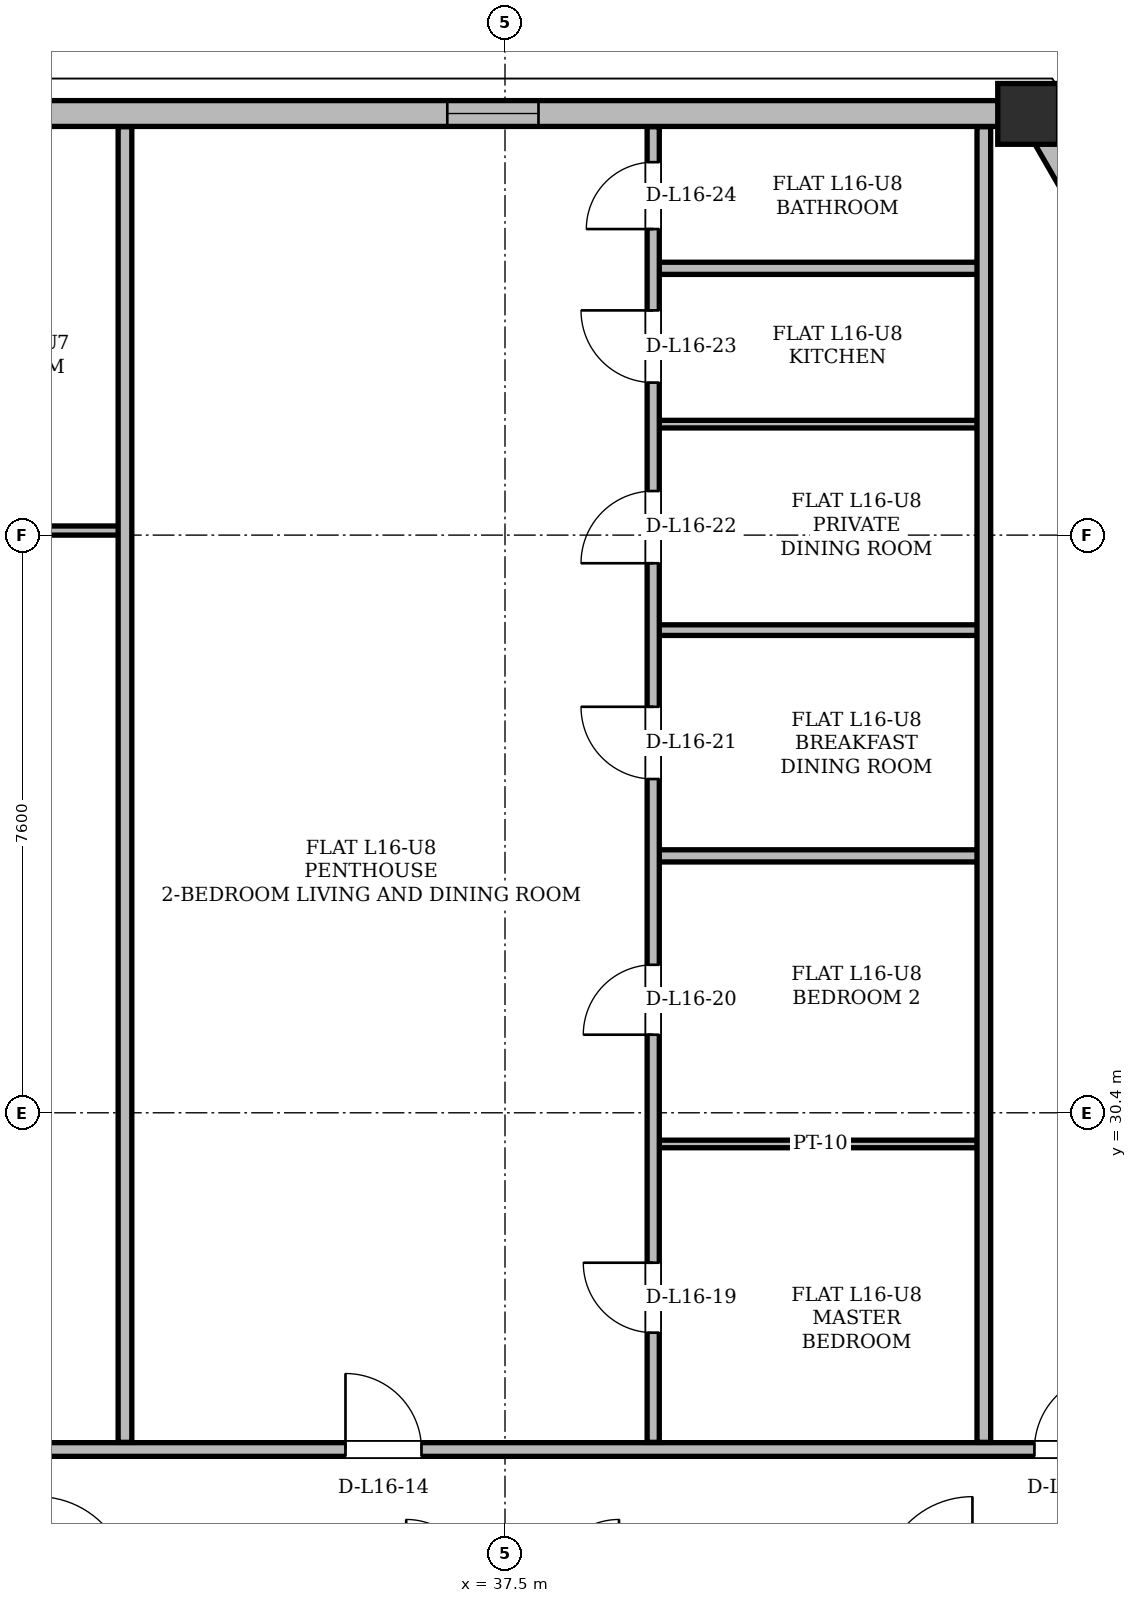
"""IFC4 building model, lengths in metres.
Left out: names, types, materials, properties, quantities, classifications, styles, units other than length and angle.
Written with IfcOpenShell. Run it as: python <this file> out.ifc"""

import sys

from ifc_helpers import new_model, si_unit, direction, frame, frame_2d, origin, origin_2d, place, context, subcontext, project, spatial, rectangle, hollow_rectangle, extrude, element, fill, save


model = new_model("IFC4")
c1 = context("Model", 3, precision=1e-05, world=origin(), true_north=direction((0.0, 1.0)))
c2 = subcontext(c1, "Body", "Model", "MODEL_VIEW")
j1 = project(units=[si_unit("LENGTHUNIT", "METRE"), si_unit("PLANEANGLEUNIT", "RADIAN")], contexts=[c1])
p1 = place(None, origin())
s1 = spatial("IfcSite", under=j1, at=p1, CompositionType="ELEMENT")
p2 = place(p1, origin())
s2 = spatial("IfcBuilding", under=s1, at=p2, CompositionType="ELEMENT")
p3 = place(p2, frame((0.0, 0.0, 63.3)))
s3 = spatial("IfcBuildingStorey", under=s2, at=p3, CompositionType="ELEMENT", Elevation=63.3)
p4 = place(p3, frame((44.436, 43.546, 0.004), z_axis=(-0.029221221178, -0.002582340476, 0.999569633268), x_axis=(0.088029024614, -0.996117910102, 0.0)))
e1 = element("IfcColumn", 1, at=p4, inside=s3, PredefinedType="COLUMN", context=c2, shape_type="SweptSolid", body=[
    extrude(hollow_rectangle(XDim=0.8, YDim=0.8, WallThickness=0.065, at=origin_2d()), origin(), (0.0, 0.0, 1.0), 3.593),
])
p5 = place(p3, frame((61.273, 14.383, 0.0), z_axis=(0.0, 0.0, 1.0), x_axis=(-0.500001933811, 0.866024287295, 0.0)))
e2 = element("IfcWall", 2, at=p5, inside=s3, PredefinedType="SOLIDWALL", context=c2, shape_type="SweptSolid", body=[
    extrude(rectangle(XDim=33.675, YDim=0.34, at=frame_2d((16.837, 0.0))), origin(), (0.0, 0.0, 1.0), 2.494),
])
p6 = place(p5, frame((7.615, 0.0, 0.0)))
e3 = element("IfcOpeningElement", 3, at=p6, cuts=e2, PredefinedType="OPENING", context=c2, shape_type="SweptSolid", body=[
    extrude(rectangle(XDim=1.5, YDim=2.2, at=frame_2d((0.75, 1.1))), frame((0.0, 0.17, 0.0), z_axis=(0.0, -1.0, 0.0), x_axis=(1.0, 0.0, 0.0)), (0.0, 0.0, 1.0), 0.34),
])
p7 = place(p5, frame((25.805, 0.0, 0.0)))
e4 = element("IfcOpeningElement", 4, at=p7, cuts=e2, PredefinedType="OPENING", context=c2, shape_type="SweptSolid", body=[
    extrude(rectangle(XDim=1.5, YDim=2.2, at=frame_2d((0.75, 1.1))), frame((0.0, 0.17, 0.0), z_axis=(0.0, -1.0, 0.0), x_axis=(1.0, 0.0, 0.0)), (0.0, 0.0, 1.0), 0.34),
])
p8 = place(p5, frame((1.57, 0.0, 0.85)))
e5 = element("IfcOpeningElement", 5, at=p8, cuts=e2, PredefinedType="OPENING", context=c2, shape_type="SweptSolid", body=[
    extrude(rectangle(XDim=1.4, YDim=1.534, at=frame_2d((0.7, 0.767))), frame((0.0, 0.17, 0.0), z_axis=(0.0, -1.0, 0.0), x_axis=(1.0, 0.0, 0.0)), (0.0, 0.0, 1.0), 0.34),
])
p9 = place(p5, frame((20.436, 0.0, 0.85)))
e6 = element("IfcOpeningElement", 6, at=p9, cuts=e2, PredefinedType="OPENING", context=c2, shape_type="SweptSolid", body=[
    extrude(rectangle(XDim=1.2, YDim=1.48, at=frame_2d((0.6, 0.74))), frame((0.0, 0.17, 0.0), z_axis=(0.0, -1.0, 0.0), x_axis=(1.0, 0.0, 0.0)), (0.0, 0.0, 1.0), 0.34),
])
p10 = place(p5, frame((29.61, 0.0, 0.85)))
e7 = element("IfcOpeningElement", 7, at=p10, cuts=e2, PredefinedType="OPENING", context=c2, shape_type="SweptSolid", body=[
    extrude(rectangle(XDim=2.2, YDim=1.534, at=frame_2d((1.1, 0.767))), frame((0.0, 0.17, 0.0), z_axis=(0.0, -1.0, 0.0), x_axis=(1.0, 0.0, 0.0)), (0.0, 0.0, 1.0), 0.34),
])
p11 = place(p5, frame((15.013, 0.0, 0.85)))
e8 = element("IfcOpeningElement", 8, at=p11, cuts=e2, PredefinedType="OPENING", context=c2, shape_type="SweptSolid", body=[
    extrude(rectangle(XDim=1.2, YDim=1.48, at=frame_2d((0.6, 0.74))), frame((0.0, 0.17, 0.0), z_axis=(0.0, -1.0, 0.0), x_axis=(1.0, 0.0, 0.0)), (0.0, 0.0, 1.0), 0.34),
])
p12 = place(p5, frame((17.765, 0.0, 0.85)))
e9 = element("IfcOpeningElement", 9, at=p12, cuts=e2, PredefinedType="OPENING", context=c2, shape_type="SweptSolid", body=[
    extrude(rectangle(XDim=1.2, YDim=1.48, at=frame_2d((0.6, 0.74))), frame((0.0, 0.17, 0.0), z_axis=(0.0, -1.0, 0.0), x_axis=(1.0, 0.0, 0.0)), (0.0, 0.0, 1.0), 0.34),
])
p13 = place(p3, frame((44.436, 43.546, 0.0), z_axis=(0.0, 0.0, 1.0), x_axis=(-1.0, 0.0, 0.0)))
e10 = element("IfcWall", 10, at=p13, inside=s3, PredefinedType="SOLIDWALL", context=c2, shape_type="SweptSolid", body=[
    extrude(rectangle(XDim=13.872, YDim=0.34, at=frame_2d((6.936, 0.0))), origin(), (0.0, 0.0, 1.0), 2.494),
])
p14 = place(p13, frame((6.495, 0.0, 0.85)))
e11 = element("IfcOpeningElement", 11, at=p14, cuts=e10, PredefinedType="OPENING", context=c2, shape_type="SweptSolid", body=[
    extrude(rectangle(XDim=1.2, YDim=1.48, at=frame_2d((0.6, 0.74))), frame((0.0, 0.17, 0.0), z_axis=(0.0, -1.0, 0.0), x_axis=(1.0, 0.0, 0.0)), (0.0, 0.0, 1.0), 0.34),
])
p15 = place(p3, frame((27.55, 25.97, 0.0), z_axis=(0.0, 0.0, 1.0), x_axis=(1.0, 0.0, 0.0)))
e12 = element("IfcWall", 12, at=p15, inside=s3, PredefinedType="PARTITIONING", context=c2, shape_type="SweptSolid", body=[
    extrude(rectangle(XDim=19.9, YDim=0.18, at=frame_2d((9.95, 0.0))), origin(), (0.0, 0.0, 1.0), 2.738),
])
p16 = place(p15, frame((2.07, 0.0, 0.0)))
e13 = element("IfcOpeningElement", 13, at=p16, cuts=e12, PredefinedType="OPENING", context=c2, shape_type="SweptSolid", body=[
    extrude(rectangle(XDim=1.0, YDim=2.18, at=frame_2d((0.5, 1.09))), frame((0.0, 0.09, 0.0), z_axis=(0.0, -1.0, 0.0), x_axis=(1.0, 0.0, 0.0)), (0.0, 0.0, 1.0), 0.18),
])
p17 = place(p15, frame((7.851, 0.0, 0.0)))
e14 = element("IfcOpeningElement", 14, at=p17, cuts=e12, PredefinedType="OPENING", context=c2, shape_type="SweptSolid", body=[
    extrude(rectangle(XDim=1.0, YDim=2.18, at=frame_2d((0.5, 1.09))), frame((0.0, 0.09, 0.0), z_axis=(0.0, -1.0, 0.0), x_axis=(1.0, 0.0, 0.0)), (0.0, 0.0, 1.0), 0.18),
])
p18 = place(p15, frame((16.916, 0.0, 0.0)))
e15 = element("IfcOpeningElement", 15, at=p18, cuts=e12, PredefinedType="OPENING", context=c2, shape_type="SweptSolid", body=[
    extrude(rectangle(XDim=1.0, YDim=2.18, at=frame_2d((0.5, 1.09))), frame((0.0, 0.09, 0.0), z_axis=(0.0, -1.0, 0.0), x_axis=(1.0, 0.0, 0.0)), (0.0, 0.0, 1.0), 0.18),
])
p19 = place(p3, frame((39.45, 29.99, 0.0), z_axis=(0.0, 0.0, 1.0), x_axis=(1.0, 0.0, 0.0)))
e16 = element("IfcWall", 16, at=p19, inside=s3, PredefinedType="PARTITIONING", context=c2, shape_type="SweptSolid", body=[
    extrude(rectangle(XDim=4.4, YDim=0.1, at=frame_2d((2.2, 0.0))), origin(), (0.0, 0.0, 1.0), 3.36),
])
p20 = place(p3, frame((39.45, 33.78, 0.0), z_axis=(0.0, 0.0, 1.0), x_axis=(1.0, 0.0, 0.0)))
e17 = element("IfcWall", 17, at=p20, inside=s3, PredefinedType="PARTITIONING", context=c2, shape_type="SweptSolid", body=[
    extrude(rectangle(XDim=4.4, YDim=0.16, at=frame_2d((2.2, 0.0))), origin(), (0.0, 0.0, 1.0), 3.36),
])
p21 = place(p3, frame((39.45, 36.75, 0.0), z_axis=(0.0, 0.0, 1.0), x_axis=(1.0, 0.0, 0.0)))
e18 = element("IfcWall", 18, at=p21, inside=s3, PredefinedType="PARTITIONING", context=c2, shape_type="SweptSolid", body=[
    extrude(rectangle(XDim=4.4, YDim=0.14, at=frame_2d((2.2, 0.0))), origin(), (0.0, 0.0, 1.0), 3.36),
])
p22 = place(p3, frame((27.598, 38.06, 0.0), z_axis=(0.0, 0.0, 1.0), x_axis=(1.0, 0.0, 0.0)))
e19 = element("IfcWall", 19, at=p22, inside=s3, PredefinedType="PARTITIONING", context=c2, shape_type="SweptSolid", body=[
    extrude(rectangle(XDim=4.984, YDim=0.12, at=frame_2d((2.492, 0.0))), origin(), (0.0, 0.0, 1.0), 2.738),
])
p23 = place(p22, frame((1.995, 0.0, 0.0)))
e20 = element("IfcOpeningElement", 20, at=p23, cuts=e19, PredefinedType="OPENING", context=c2, shape_type="SweptSolid", body=[
    extrude(rectangle(XDim=0.88, YDim=2.08, at=frame_2d((0.44, 1.04))), frame((0.0, 0.06, 0.0), z_axis=(0.0, -1.0, 0.0), x_axis=(1.0, 0.0, 0.0)), (0.0, 0.0, 1.0), 0.12),
])
p24 = place(p3, frame((39.45, 39.46, 0.0), z_axis=(0.0, 0.0, 1.0), x_axis=(1.0, 0.0, 0.0)))
e21 = element("IfcWall", 21, at=p24, inside=s3, PredefinedType="PARTITIONING", context=c2, shape_type="SweptSolid", body=[
    extrude(rectangle(XDim=4.4, YDim=0.1, at=frame_2d((2.2, 0.0))), origin(), (0.0, 0.0, 1.0), 3.36),
])
p25 = place(p3, frame((39.45, 41.51, 0.0), z_axis=(0.0, 0.0, 1.0), x_axis=(1.0, 0.0, 0.0)))
e22 = element("IfcWall", 22, at=p25, inside=s3, PredefinedType="PARTITIONING", context=c2, shape_type="SweptSolid", body=[
    extrude(rectangle(XDim=4.4, YDim=0.16, at=frame_2d((2.2, 0.0))), origin(), (0.0, 0.0, 1.0), 3.36),
])
p26 = place(p3, frame((32.5, 26.064, 0.0), z_axis=(0.0, 0.0, 1.0), x_axis=(0.0, 1.0, 0.0)))
e23 = element("IfcWall", 23, at=p26, inside=s3, PredefinedType="PARTITIONING", context=c2, shape_type="SweptSolid", body=[
    extrude(rectangle(XDim=17.309, YDim=0.18, at=frame_2d((8.654, 0.0))), origin(), (0.0, 0.0, 1.0), 3.36),
])
p27 = place(p3, frame((39.45, 26.064, 0.0), z_axis=(0.0, 0.0, 1.0), x_axis=(0.0, 1.0, 0.0)))
e24 = element("IfcWall", 24, at=p27, inside=s3, PredefinedType="PARTITIONING", context=c2, shape_type="SweptSolid", body=[
    extrude(rectangle(XDim=17.309, YDim=0.16, at=frame_2d((8.654, 0.0))), origin(), (0.0, 0.0, 1.0), 3.36),
])
p28 = place(p27, frame((1.443, 0.0, 0.0)))
e25 = element("IfcOpeningElement", 25, at=p28, cuts=e24, PredefinedType="OPENING", context=c2, shape_type="SweptSolid", body=[
    extrude(rectangle(XDim=0.92, YDim=2.12, at=frame_2d((0.46, 1.06))), frame((0.0, 0.08, 0.0), z_axis=(0.0, -1.0, 0.0), x_axis=(1.0, 0.0, 0.0)), (0.0, 0.0, 1.0), 0.16),
])
p29 = place(p27, frame((5.363, 0.0, 0.0)))
e26 = element("IfcOpeningElement", 26, at=p29, cuts=e24, PredefinedType="OPENING", context=c2, shape_type="SweptSolid", body=[
    extrude(rectangle(XDim=0.92, YDim=2.12, at=frame_2d((0.46, 1.06))), frame((0.0, 0.08, 0.0), z_axis=(0.0, -1.0, 0.0), x_axis=(1.0, 0.0, 0.0)), (0.0, 0.0, 1.0), 0.16),
])
p30 = place(p27, frame((8.727, 0.0, 0.0)))
e27 = element("IfcOpeningElement", 27, at=p30, cuts=e24, PredefinedType="OPENING", context=c2, shape_type="SweptSolid", body=[
    extrude(rectangle(XDim=0.95, YDim=2.1, at=frame_2d((0.475, 1.05))), frame((0.0, 0.08, 0.0), z_axis=(0.0, -1.0, 0.0), x_axis=(1.0, 0.0, 0.0)), (0.0, 0.0, 1.0), 0.16),
])
p31 = place(p27, frame((11.566, 0.0, 0.0)))
e28 = element("IfcOpeningElement", 28, at=p31, cuts=e24, PredefinedType="OPENING", context=c2, shape_type="SweptSolid", body=[
    extrude(rectangle(XDim=0.95, YDim=2.1, at=frame_2d((0.475, 1.05))), frame((0.0, 0.08, 0.0), z_axis=(0.0, -1.0, 0.0), x_axis=(1.0, 0.0, 0.0)), (0.0, 0.0, 1.0), 0.16),
])
p32 = place(p27, frame((13.942, 0.0, 0.0)))
e29 = element("IfcOpeningElement", 29, at=p32, cuts=e24, PredefinedType="OPENING", context=c2, shape_type="SweptSolid", body=[
    extrude(rectangle(XDim=0.95, YDim=2.1, at=frame_2d((0.475, 1.05))), frame((0.0, 0.08, 0.0), z_axis=(0.0, -1.0, 0.0), x_axis=(1.0, 0.0, 0.0)), (0.0, 0.0, 1.0), 0.16),
])
p33 = place(p27, frame((15.962, 0.0, 0.0)))
e30 = element("IfcOpeningElement", 30, at=p33, cuts=e24, PredefinedType="OPENING", context=c2, shape_type="SweptSolid", body=[
    extrude(rectangle(XDim=0.88, YDim=2.08, at=frame_2d((0.44, 1.04))), frame((0.0, 0.08, 0.0), z_axis=(0.0, -1.0, 0.0), x_axis=(1.0, 0.0, 0.0)), (0.0, 0.0, 1.0), 0.16),
])
p34 = place(p3, frame((43.8, 26.064, 0.0), z_axis=(0.0, 0.0, 1.0), x_axis=(0.0, 1.0, 0.0)))
e31 = element("IfcWall", 31, at=p34, inside=s3, PredefinedType="PARTITIONING", context=c2, shape_type="SweptSolid", body=[
    extrude(rectangle(XDim=17.309, YDim=0.18, at=frame_2d((8.654, 0.0))), origin(), (0.0, 0.0, 1.0), 3.36),
])
p35 = place(p14, origin())
e32 = element("IfcWindow", 32, at=p35, inside=s3, PartitioningType="SINGLE_PANEL", PredefinedType="WINDOW", context=c2, shape_type="SweptSolid", body=[
    extrude(rectangle(XDim=1.2, YDim=1.48, at=frame_2d((0.6, 0.74))), frame((0.0, 0.03, 0.0), z_axis=(0.0, -1.0, 0.0), x_axis=(1.0, 0.0, 0.0)), (0.0, 0.0, 1.0), 0.06),
])
fill(e11, e32)
p36 = place(p17, origin())
e33 = element("IfcDoor", 33, at=p36, inside=s3, OperationType="SINGLE_SWING_LEFT", PredefinedType="DOOR", context=c2, shape_type="SweptSolid", body=[
    extrude(rectangle(XDim=1.0, YDim=2.18, at=frame_2d((0.5, 1.09))), frame((0.0, 0.025, 0.0), z_axis=(0.0, -1.0, 0.0), x_axis=(1.0, 0.0, 0.0)), (0.0, 0.0, 1.0), 0.05),
])
fill(e14, e33)
p37 = place(p18, origin())
e34 = element("IfcDoor", 34, at=p37, inside=s3, OperationType="SINGLE_SWING_RIGHT", PredefinedType="DOOR", context=c2, shape_type="SweptSolid", body=[
    extrude(rectangle(XDim=1.0, YDim=2.18, at=frame_2d((0.5, 1.09))), frame((0.0, 0.025, 0.0), z_axis=(0.0, -1.0, 0.0), x_axis=(1.0, 0.0, 0.0)), (0.0, 0.0, 1.0), 0.05),
])
fill(e15, e34)
p38 = place(p28, origin())
e35 = element("IfcDoor", 35, at=p38, inside=s3, OperationType="SINGLE_SWING_RIGHT", PredefinedType="DOOR", context=c2, shape_type="SweptSolid", body=[
    extrude(rectangle(XDim=0.92, YDim=2.12, at=frame_2d((0.46, 1.06))), frame((0.0, 0.025, 0.0), z_axis=(0.0, -1.0, 0.0), x_axis=(1.0, 0.0, 0.0)), (0.0, 0.0, 1.0), 0.05),
])
fill(e25, e35)
p39 = place(p29, origin())
e36 = element("IfcDoor", 36, at=p39, inside=s3, OperationType="SINGLE_SWING_LEFT", PredefinedType="DOOR", context=c2, shape_type="SweptSolid", body=[
    extrude(rectangle(XDim=0.92, YDim=2.12, at=frame_2d((0.46, 1.06))), frame((0.0, 0.025, 0.0), z_axis=(0.0, -1.0, 0.0), x_axis=(1.0, 0.0, 0.0)), (0.0, 0.0, 1.0), 0.05),
])
fill(e26, e36)
p40 = place(p30, origin())
e37 = element("IfcDoor", 37, at=p40, inside=s3, OperationType="SINGLE_SWING_RIGHT", PredefinedType="DOOR", context=c2, shape_type="SweptSolid", body=[
    extrude(rectangle(XDim=0.95, YDim=2.1, at=frame_2d((0.475, 1.05))), frame((0.0, 0.025, 0.0), z_axis=(0.0, -1.0, 0.0), x_axis=(1.0, 0.0, 0.0)), (0.0, 0.0, 1.0), 0.05),
])
fill(e27, e37)
p41 = place(p31, origin())
e38 = element("IfcDoor", 38, at=p41, inside=s3, OperationType="SINGLE_SWING_LEFT", PredefinedType="DOOR", context=c2, shape_type="SweptSolid", body=[
    extrude(rectangle(XDim=0.95, YDim=2.1, at=frame_2d((0.475, 1.05))), frame((0.0, 0.025, 0.0), z_axis=(0.0, -1.0, 0.0), x_axis=(1.0, 0.0, 0.0)), (0.0, 0.0, 1.0), 0.05),
])
fill(e28, e38)
p42 = place(p32, origin())
e39 = element("IfcDoor", 39, at=p42, inside=s3, OperationType="SINGLE_SWING_RIGHT", PredefinedType="DOOR", context=c2, shape_type="SweptSolid", body=[
    extrude(rectangle(XDim=0.95, YDim=2.1, at=frame_2d((0.475, 1.05))), frame((0.0, 0.025, 0.0), z_axis=(0.0, -1.0, 0.0), x_axis=(1.0, 0.0, 0.0)), (0.0, 0.0, 1.0), 0.05),
])
fill(e29, e39)
p43 = place(p33, origin())
e40 = element("IfcDoor", 40, at=p43, inside=s3, OperationType="SINGLE_SWING_LEFT", PredefinedType="DOOR", context=c2, shape_type="SweptSolid", body=[
    extrude(rectangle(XDim=0.88, YDim=2.08, at=frame_2d((0.44, 1.04))), frame((0.0, 0.025, 0.0), z_axis=(0.0, -1.0, 0.0), x_axis=(1.0, 0.0, 0.0)), (0.0, 0.0, 1.0), 0.05),
])
fill(e30, e40)
save(model, sys.argv[1])
